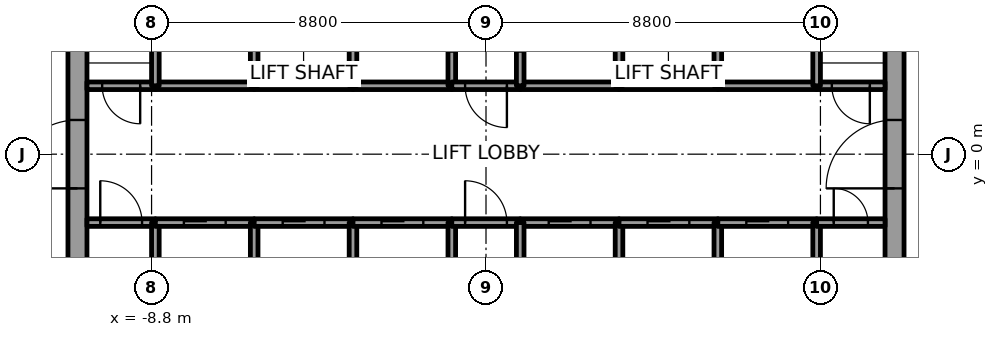
"""IFC4 building model, lengths in metres.
Left out: names, types, materials, properties, quantities, classifications, styles, units other than length and angle.
Written with IfcOpenShell. Run it as: python <this file> out.ifc"""

import sys

from ifc_helpers import new_model, si_unit, direction, frame, frame_2d, origin, place, context, subcontext, project, spatial, rectangle, extrude, element, fill, save


model = new_model("IFC4")
c1 = context("Model", 3, precision=1e-05, world=origin(), true_north=direction((0.0, 1.0)))
c2 = subcontext(c1, "Body", "Model", "MODEL_VIEW")
j1 = project(units=[si_unit("LENGTHUNIT", "METRE"), si_unit("PLANEANGLEUNIT", "RADIAN")], contexts=[c1])
p1 = place(None, origin())
s1 = spatial("IfcSite", under=j1, at=p1, CompositionType="ELEMENT")
p2 = place(p1, origin())
s2 = spatial("IfcBuilding", under=s1, at=p2, CompositionType="ELEMENT")
p3 = place(p2, frame((0.0, 0.0, 145.8)))
s3 = spatial("IfcBuildingStorey", under=s2, at=p3, CompositionType="ELEMENT", Elevation=145.8)
p4 = place(p3, frame((-10.75, -7.5, 0.0), z_axis=(0.0, 0.0, 1.0), x_axis=(0.0, 1.0, 0.0)))
e1 = element("IfcWall", 1, at=p4, inside=s3, PredefinedType="SHEAR", context=c2, shape_type="SweptSolid", body=[
    extrude(rectangle(XDim=15.0, YDim=0.5, at=frame_2d((7.5, 0.0))), origin(), (0.0, 0.0, 1.0), 4.0),
])
p5 = place(p4, frame((6.6, 0.0, 0.0)))
e2 = element("IfcOpeningElement", 2, at=p5, cuts=e1, PredefinedType="OPENING", context=c2, shape_type="SweptSolid", body=[
    extrude(rectangle(XDim=1.8, YDim=2.1, at=frame_2d((0.9, 1.05))), frame((0.0, 0.25, 0.0), z_axis=(0.0, -1.0, 0.0), x_axis=(1.0, 0.0, 0.0)), (0.0, 0.0, 1.0), 0.5),
])
p6 = place(p3, frame((10.75, -7.5, 0.0), z_axis=(0.0, 0.0, 1.0), x_axis=(0.0, 1.0, 0.0)))
e3 = element("IfcWall", 3, at=p6, inside=s3, PredefinedType="SHEAR", context=c2, shape_type="SweptSolid", body=[
    extrude(rectangle(XDim=15.0, YDim=0.5, at=frame_2d((7.5, 0.0))), origin(), (0.0, 0.0, 1.0), 4.0),
])
p7 = place(p6, frame((6.6, 0.0, 0.0)))
e4 = element("IfcOpeningElement", 4, at=p7, cuts=e3, PredefinedType="OPENING", context=c2, shape_type="SweptSolid", body=[
    extrude(rectangle(XDim=1.8, YDim=2.1, at=frame_2d((0.9, 1.05))), frame((0.0, 0.25, 0.0), z_axis=(0.0, -1.0, 0.0), x_axis=(1.0, 0.0, 0.0)), (0.0, 0.0, 1.0), 0.5),
])
p8 = place(p3, frame((-10.5, -1.8, 0.0), z_axis=(0.0, 0.0, 1.0), x_axis=(1.0, 0.0, 0.0)))
e5 = element("IfcWall", 5, at=p8, inside=s3, PredefinedType="SOLIDWALL", context=c2, shape_type="SweptSolid", body=[
    extrude(rectangle(XDim=1.8, YDim=0.2, at=frame_2d((0.9, 0.0))), origin(), (0.0, 0.0, 1.0), 3.85),
])
p9 = place(p8, frame((0.35, 0.0, 0.0)))
e6 = element("IfcOpeningElement", 6, at=p9, cuts=e5, PredefinedType="OPENING", context=c2, shape_type="SweptSolid", body=[
    extrude(rectangle(XDim=1.1, YDim=2.1, at=frame_2d((0.55, 1.05))), frame((0.0, 0.1, 0.0), z_axis=(0.0, -1.0, 0.0), x_axis=(1.0, 0.0, 0.0)), (0.0, 0.0, 1.0), 0.2),
])
p10 = place(p3, frame((-8.7, 1.8, 0.0), z_axis=(0.0, 0.0, 1.0), x_axis=(-1.0, 0.0, 0.0)))
e7 = element("IfcWall", 7, at=p10, inside=s3, PredefinedType="SOLIDWALL", context=c2, shape_type="SweptSolid", body=[
    extrude(rectangle(XDim=1.8, YDim=0.2, at=frame_2d((0.9, 0.0))), origin(), (0.0, 0.0, 1.0), 3.85),
])
p11 = place(p10, frame((0.4, 0.0, 0.0)))
e8 = element("IfcOpeningElement", 8, at=p11, cuts=e7, PredefinedType="OPENING", context=c2, shape_type="SweptSolid", body=[
    extrude(rectangle(XDim=1.0, YDim=2.1, at=frame_2d((0.5, 1.05))), frame((0.0, 0.1, 0.0), z_axis=(0.0, -1.0, 0.0), x_axis=(1.0, 0.0, 0.0)), (0.0, 0.0, 1.0), 0.2),
])
p12 = place(p3, frame((-8.7, -4.6, 0.0), z_axis=(0.0, 0.0, 1.0), x_axis=(0.0, 1.0, 0.0)))
e9 = element("IfcWall", 9, at=p12, inside=s3, PredefinedType="SOLIDWALL", context=c2, shape_type="SweptSolid", body=[
    extrude(rectangle(XDim=2.8, YDim=0.2, at=frame_2d((1.4, 0.0))), origin(), (0.0, 0.0, 1.0), 3.85),
])
p13 = place(p3, frame((-8.7, -1.8, 0.0), z_axis=(0.0, 0.0, 1.0), x_axis=(1.0, 0.0, 0.0)))
e10 = element("IfcWall", 10, at=p13, inside=s3, PredefinedType="SOLIDWALL", context=c2, shape_type="SweptSolid", body=[
    extrude(rectangle(XDim=2.6, YDim=0.2, at=frame_2d((1.3, 0.0))), origin(), (0.0, 0.0, 1.0), 3.85),
])
p14 = place(p13, frame((0.75, 0.0, 0.0)))
e11 = element("IfcOpeningElement", 11, at=p14, cuts=e10, PredefinedType="OPENING", context=c2, shape_type="SweptSolid", body=[
    extrude(rectangle(XDim=1.1, YDim=2.1, at=frame_2d((0.55, 1.05))), frame((0.0, 0.1, 0.0), z_axis=(0.0, -1.0, 0.0), x_axis=(1.0, 0.0, 0.0)), (0.0, 0.0, 1.0), 0.2),
])
p15 = place(p3, frame((-6.1, 1.8, 0.0), z_axis=(0.0, 0.0, 1.0), x_axis=(-1.0, 0.0, 0.0)))
e12 = element("IfcWall", 12, at=p15, inside=s3, PredefinedType="SOLIDWALL", context=c2, shape_type="SweptSolid", body=[
    extrude(rectangle(XDim=2.6, YDim=0.2, at=frame_2d((1.3, 0.0))), origin(), (0.0, 0.0, 1.0), 3.85),
])
for number, where, z_axis, x_axis in (
    (13, (-8.7, 1.8, 0.0), (0.0, 0.0, 1.0), (0.0, 1.0, 0.0)),
    (14, (-6.1, -4.6, 0.0), (0.0, 0.0, 1.0), (0.0, 1.0, 0.0)),
):
    element("IfcWall", number, at=place(p3, frame(where, z_axis=z_axis, x_axis=x_axis)), inside=s3, PredefinedType="SOLIDWALL", context=c2, shape_type="SweptSolid", body=[
        extrude(rectangle(XDim=2.8, YDim=0.2, at=frame_2d((1.4, 0.0))), origin(), (0.0, 0.0, 1.0), 3.85),
    ])
p16 = place(p3, frame((-6.1, -1.8, 0.0), z_axis=(0.0, 0.0, 1.0), x_axis=(1.0, 0.0, 0.0)))
e15 = element("IfcWall", 15, at=p16, inside=s3, PredefinedType="SOLIDWALL", context=c2, shape_type="SweptSolid", body=[
    extrude(rectangle(XDim=2.6, YDim=0.2, at=frame_2d((1.3, 0.0))), origin(), (0.0, 0.0, 1.0), 3.85),
])
p17 = place(p16, frame((0.75, 0.0, 0.0)))
e16 = element("IfcOpeningElement", 16, at=p17, cuts=e15, PredefinedType="OPENING", context=c2, shape_type="SweptSolid", body=[
    extrude(rectangle(XDim=1.1, YDim=2.1, at=frame_2d((0.55, 1.05))), frame((0.0, 0.1, 0.0), z_axis=(0.0, -1.0, 0.0), x_axis=(1.0, 0.0, 0.0)), (0.0, 0.0, 1.0), 0.2),
])
p18 = place(p3, frame((-3.5, 1.8, 0.0), z_axis=(0.0, 0.0, 1.0), x_axis=(-1.0, 0.0, 0.0)))
e17 = element("IfcWall", 17, at=p18, inside=s3, PredefinedType="SOLIDWALL", context=c2, shape_type="SweptSolid", body=[
    extrude(rectangle(XDim=2.6, YDim=0.2, at=frame_2d((1.3, 0.0))), origin(), (0.0, 0.0, 1.0), 3.85),
])
for number, where, z_axis, x_axis in (
    (18, (-6.1, 1.8, 0.0), (0.0, 0.0, 1.0), (0.0, 1.0, 0.0)),
    (19, (-3.5, -4.6, 0.0), (0.0, 0.0, 1.0), (0.0, 1.0, 0.0)),
):
    element("IfcWall", number, at=place(p3, frame(where, z_axis=z_axis, x_axis=x_axis)), inside=s3, PredefinedType="SOLIDWALL", context=c2, shape_type="SweptSolid", body=[
        extrude(rectangle(XDim=2.8, YDim=0.2, at=frame_2d((1.4, 0.0))), origin(), (0.0, 0.0, 1.0), 3.85),
    ])
p19 = place(p3, frame((-3.5, -1.8, 0.0), z_axis=(0.0, 0.0, 1.0), x_axis=(1.0, 0.0, 0.0)))
e20 = element("IfcWall", 20, at=p19, inside=s3, PredefinedType="SOLIDWALL", context=c2, shape_type="SweptSolid", body=[
    extrude(rectangle(XDim=2.6, YDim=0.2, at=frame_2d((1.3, 0.0))), origin(), (0.0, 0.0, 1.0), 3.85),
])
p20 = place(p19, frame((0.75, 0.0, 0.0)))
e21 = element("IfcOpeningElement", 21, at=p20, cuts=e20, PredefinedType="OPENING", context=c2, shape_type="SweptSolid", body=[
    extrude(rectangle(XDim=1.1, YDim=2.1, at=frame_2d((0.55, 1.05))), frame((0.0, 0.1, 0.0), z_axis=(0.0, -1.0, 0.0), x_axis=(1.0, 0.0, 0.0)), (0.0, 0.0, 1.0), 0.2),
])
p21 = place(p3, frame((-0.9, 1.8, 0.0), z_axis=(0.0, 0.0, 1.0), x_axis=(-1.0, 0.0, 0.0)))
e22 = element("IfcWall", 22, at=p21, inside=s3, PredefinedType="SOLIDWALL", context=c2, shape_type="SweptSolid", body=[
    extrude(rectangle(XDim=2.6, YDim=0.2, at=frame_2d((1.3, 0.0))), origin(), (0.0, 0.0, 1.0), 3.85),
])
p22 = place(p3, frame((-3.5, 4.6, 0.0), z_axis=(0.0, 0.0, 1.0), x_axis=(0.0, -1.0, 0.0)))
e23 = element("IfcWall", 23, at=p22, inside=s3, PredefinedType="SOLIDWALL", context=c2, shape_type="SweptSolid", body=[
    extrude(rectangle(XDim=2.8, YDim=0.2, at=frame_2d((1.4, 0.0))), origin(), (0.0, 0.0, 1.0), 3.85),
])
p23 = place(p3, frame((-0.9, 1.8, 0.0), z_axis=(0.0, 0.0, 1.0), x_axis=(0.0, 1.0, 0.0)))
e24 = element("IfcWall", 24, at=p23, inside=s3, PredefinedType="SOLIDWALL", context=c2, shape_type="SweptSolid", body=[
    extrude(rectangle(XDim=3.0, YDim=0.2, at=frame_2d((1.5, 0.0))), origin(), (0.0, 0.0, 1.0), 3.85),
])
p24 = place(p23, frame((0.9, 0.0, 0.0)))
e25 = element("IfcOpeningElement", 25, at=p24, cuts=e24, PredefinedType="OPENING", context=c2, shape_type="SweptSolid", body=[
    extrude(rectangle(XDim=1.2, YDim=2.1, at=frame_2d((0.6, 1.05))), frame((0.0, 0.1, 0.0), z_axis=(0.0, -1.0, 0.0), x_axis=(1.0, 0.0, 0.0)), (0.0, 0.0, 1.0), 0.2),
])
p25 = place(p3, frame((-0.9, -4.6, 0.0), z_axis=(0.0, 0.0, 1.0), x_axis=(0.0, 1.0, 0.0)))
e26 = element("IfcWall", 26, at=p25, inside=s3, PredefinedType="SOLIDWALL", context=c2, shape_type="SweptSolid", body=[
    extrude(rectangle(XDim=2.8, YDim=0.2, at=frame_2d((1.4, 0.0))), origin(), (0.0, 0.0, 1.0), 3.85),
])
p26 = place(p3, frame((-0.9, -1.8, 0.0), z_axis=(0.0, 0.0, 1.0), x_axis=(1.0, 0.0, 0.0)))
e27 = element("IfcWall", 27, at=p26, inside=s3, PredefinedType="SOLIDWALL", context=c2, shape_type="SweptSolid", body=[
    extrude(rectangle(XDim=1.8, YDim=0.2, at=frame_2d((0.9, 0.0))), origin(), (0.0, 0.0, 1.0), 3.85),
])
p27 = place(p26, frame((0.35, 0.0, 0.0)))
e28 = element("IfcOpeningElement", 28, at=p27, cuts=e27, PredefinedType="OPENING", context=c2, shape_type="SweptSolid", body=[
    extrude(rectangle(XDim=1.1, YDim=2.1, at=frame_2d((0.55, 1.05))), frame((0.0, 0.1, 0.0), z_axis=(0.0, -1.0, 0.0), x_axis=(1.0, 0.0, 0.0)), (0.0, 0.0, 1.0), 0.2),
])
p28 = place(p3, frame((0.9, 1.8, 0.0), z_axis=(0.0, 0.0, 1.0), x_axis=(-1.0, 0.0, 0.0)))
e29 = element("IfcWall", 29, at=p28, inside=s3, PredefinedType="SOLIDWALL", context=c2, shape_type="SweptSolid", body=[
    extrude(rectangle(XDim=1.8, YDim=0.2, at=frame_2d((0.9, 0.0))), origin(), (0.0, 0.0, 1.0), 3.85),
])
p29 = place(p28, frame((0.35, 0.0, 0.0)))
e30 = element("IfcOpeningElement", 30, at=p29, cuts=e29, PredefinedType="OPENING", context=c2, shape_type="SweptSolid", body=[
    extrude(rectangle(XDim=1.1, YDim=2.1, at=frame_2d((0.55, 1.05))), frame((0.0, 0.1, 0.0), z_axis=(0.0, -1.0, 0.0), x_axis=(1.0, 0.0, 0.0)), (0.0, 0.0, 1.0), 0.2),
])
p30 = place(p3, frame((0.9, -1.8, 0.0), z_axis=(0.0, 0.0, 1.0), x_axis=(1.0, 0.0, 0.0)))
e31 = element("IfcWall", 31, at=p30, inside=s3, PredefinedType="SOLIDWALL", context=c2, shape_type="SweptSolid", body=[
    extrude(rectangle(XDim=2.6, YDim=0.2, at=frame_2d((1.3, 0.0))), origin(), (0.0, 0.0, 1.0), 3.85),
])
p31 = place(p30, frame((0.75, 0.0, 0.0)))
e32 = element("IfcOpeningElement", 32, at=p31, cuts=e31, PredefinedType="OPENING", context=c2, shape_type="SweptSolid", body=[
    extrude(rectangle(XDim=1.1, YDim=2.1, at=frame_2d((0.55, 1.05))), frame((0.0, 0.1, 0.0), z_axis=(0.0, -1.0, 0.0), x_axis=(1.0, 0.0, 0.0)), (0.0, 0.0, 1.0), 0.2),
])
p32 = place(p3, frame((0.9, -1.8, 0.0), z_axis=(0.0, 0.0, 1.0), x_axis=(0.0, -1.0, 0.0)))
e33 = element("IfcWall", 33, at=p32, inside=s3, PredefinedType="SOLIDWALL", context=c2, shape_type="SweptSolid", body=[
    extrude(rectangle(XDim=2.8, YDim=0.2, at=frame_2d((1.4, 0.0))), origin(), (0.0, 0.0, 1.0), 3.85),
])
p33 = place(p3, frame((3.5, 1.8, 0.0), z_axis=(0.0, 0.0, 1.0), x_axis=(-1.0, 0.0, 0.0)))
e34 = element("IfcWall", 34, at=p33, inside=s3, PredefinedType="SOLIDWALL", context=c2, shape_type="SweptSolid", body=[
    extrude(rectangle(XDim=2.6, YDim=0.2, at=frame_2d((1.3, 0.0))), origin(), (0.0, 0.0, 1.0), 3.85),
])
p34 = place(p3, frame((0.9, 4.8, 0.0), z_axis=(0.0, 0.0, 1.0), x_axis=(0.0, -1.0, 0.0)))
e35 = element("IfcWall", 35, at=p34, inside=s3, PredefinedType="SOLIDWALL", context=c2, shape_type="SweptSolid", body=[
    extrude(rectangle(XDim=3.0, YDim=0.2, at=frame_2d((1.5, 0.0))), origin(), (0.0, 0.0, 1.0), 3.85),
])
p35 = place(p34, frame((0.9, 0.0, 0.0)))
e36 = element("IfcOpeningElement", 36, at=p35, cuts=e35, PredefinedType="OPENING", context=c2, shape_type="SweptSolid", body=[
    extrude(rectangle(XDim=1.2, YDim=2.1, at=frame_2d((0.6, 1.05))), frame((0.0, 0.1, 0.0), z_axis=(0.0, -1.0, 0.0), x_axis=(1.0, 0.0, 0.0)), (0.0, 0.0, 1.0), 0.2),
])
p36 = place(p3, frame((3.5, -4.6, 0.0), z_axis=(0.0, 0.0, 1.0), x_axis=(0.0, 1.0, 0.0)))
e37 = element("IfcWall", 37, at=p36, inside=s3, PredefinedType="SOLIDWALL", context=c2, shape_type="SweptSolid", body=[
    extrude(rectangle(XDim=2.8, YDim=0.2, at=frame_2d((1.4, 0.0))), origin(), (0.0, 0.0, 1.0), 3.85),
])
p37 = place(p3, frame((3.5, -1.8, 0.0), z_axis=(0.0, 0.0, 1.0), x_axis=(1.0, 0.0, 0.0)))
e38 = element("IfcWall", 38, at=p37, inside=s3, PredefinedType="SOLIDWALL", context=c2, shape_type="SweptSolid", body=[
    extrude(rectangle(XDim=2.6, YDim=0.2, at=frame_2d((1.3, 0.0))), origin(), (0.0, 0.0, 1.0), 3.85),
])
p38 = place(p37, frame((0.75, 0.0, 0.0)))
e39 = element("IfcOpeningElement", 39, at=p38, cuts=e38, PredefinedType="OPENING", context=c2, shape_type="SweptSolid", body=[
    extrude(rectangle(XDim=1.1, YDim=2.1, at=frame_2d((0.55, 1.05))), frame((0.0, 0.1, 0.0), z_axis=(0.0, -1.0, 0.0), x_axis=(1.0, 0.0, 0.0)), (0.0, 0.0, 1.0), 0.2),
])
p39 = place(p3, frame((6.1, 1.8, 0.0), z_axis=(0.0, 0.0, 1.0), x_axis=(-1.0, 0.0, 0.0)))
e40 = element("IfcWall", 40, at=p39, inside=s3, PredefinedType="SOLIDWALL", context=c2, shape_type="SweptSolid", body=[
    extrude(rectangle(XDim=2.6, YDim=0.2, at=frame_2d((1.3, 0.0))), origin(), (0.0, 0.0, 1.0), 3.85),
])
for number, where, z_axis, x_axis in (
    (41, (3.5, 1.8, 0.0), (0.0, 0.0, 1.0), (0.0, 1.0, 0.0)),
    (42, (6.1, -4.6, 0.0), (0.0, 0.0, 1.0), (0.0, 1.0, 0.0)),
):
    element("IfcWall", number, at=place(p3, frame(where, z_axis=z_axis, x_axis=x_axis)), inside=s3, PredefinedType="SOLIDWALL", context=c2, shape_type="SweptSolid", body=[
        extrude(rectangle(XDim=2.8, YDim=0.2, at=frame_2d((1.4, 0.0))), origin(), (0.0, 0.0, 1.0), 3.85),
    ])
p40 = place(p3, frame((6.1, -1.8, 0.0), z_axis=(0.0, 0.0, 1.0), x_axis=(1.0, 0.0, 0.0)))
e43 = element("IfcWall", 43, at=p40, inside=s3, PredefinedType="SOLIDWALL", context=c2, shape_type="SweptSolid", body=[
    extrude(rectangle(XDim=2.6, YDim=0.2, at=frame_2d((1.3, 0.0))), origin(), (0.0, 0.0, 1.0), 3.85),
])
p41 = place(p40, frame((0.75, 0.0, 0.0)))
e44 = element("IfcOpeningElement", 44, at=p41, cuts=e43, PredefinedType="OPENING", context=c2, shape_type="SweptSolid", body=[
    extrude(rectangle(XDim=1.1, YDim=2.1, at=frame_2d((0.55, 1.05))), frame((0.0, 0.1, 0.0), z_axis=(0.0, -1.0, 0.0), x_axis=(1.0, 0.0, 0.0)), (0.0, 0.0, 1.0), 0.2),
])
p42 = place(p3, frame((8.7, 1.8, 0.0), z_axis=(0.0, 0.0, 1.0), x_axis=(-1.0, 0.0, 0.0)))
e45 = element("IfcWall", 45, at=p42, inside=s3, PredefinedType="SOLIDWALL", context=c2, shape_type="SweptSolid", body=[
    extrude(rectangle(XDim=2.6, YDim=0.2, at=frame_2d((1.3, 0.0))), origin(), (0.0, 0.0, 1.0), 3.85),
])
for number, where, z_axis, x_axis in (
    (46, (6.1, 1.8, 0.0), (0.0, 0.0, 1.0), (0.0, 1.0, 0.0)),
    (47, (8.7, -1.8, 0.0), (0.0, 0.0, 1.0), (0.0, -1.0, 0.0)),
):
    element("IfcWall", number, at=place(p3, frame(where, z_axis=z_axis, x_axis=x_axis)), inside=s3, PredefinedType="SOLIDWALL", context=c2, shape_type="SweptSolid", body=[
        extrude(rectangle(XDim=2.8, YDim=0.2, at=frame_2d((1.4, 0.0))), origin(), (0.0, 0.0, 1.0), 3.85),
    ])
p43 = place(p3, frame((8.7, -1.8, 0.0), z_axis=(0.0, 0.0, 1.0), x_axis=(1.0, 0.0, 0.0)))
e48 = element("IfcWall", 48, at=p43, inside=s3, PredefinedType="SOLIDWALL", context=c2, shape_type="SweptSolid", body=[
    extrude(rectangle(XDim=1.8, YDim=0.2, at=frame_2d((0.9, 0.0))), origin(), (0.0, 0.0, 1.0), 3.85),
])
p44 = place(p43, frame((0.45, 0.0, 0.0)))
e49 = element("IfcOpeningElement", 49, at=p44, cuts=e48, PredefinedType="OPENING", context=c2, shape_type="SweptSolid", body=[
    extrude(rectangle(XDim=0.9, YDim=2.1, at=frame_2d((0.45, 1.05))), frame((0.0, 0.1, 0.0), z_axis=(0.0, -1.0, 0.0), x_axis=(1.0, 0.0, 0.0)), (0.0, 0.0, 1.0), 0.2),
])
p45 = place(p3, frame((10.5, 1.8, 0.0), z_axis=(0.0, 0.0, 1.0), x_axis=(-1.0, 0.0, 0.0)))
e50 = element("IfcWall", 50, at=p45, inside=s3, PredefinedType="SOLIDWALL", context=c2, shape_type="SweptSolid", body=[
    extrude(rectangle(XDim=1.8, YDim=0.2, at=frame_2d((0.9, 0.0))), origin(), (0.0, 0.0, 1.0), 3.85),
])
p46 = place(p45, frame((0.4, 0.0, 0.0)))
e51 = element("IfcOpeningElement", 51, at=p46, cuts=e50, PredefinedType="OPENING", context=c2, shape_type="SweptSolid", body=[
    extrude(rectangle(XDim=1.0, YDim=2.1, at=frame_2d((0.5, 1.05))), frame((0.0, 0.1, 0.0), z_axis=(0.0, -1.0, 0.0), x_axis=(1.0, 0.0, 0.0)), (0.0, 0.0, 1.0), 0.2),
])
p47 = place(p3, frame((8.7, 4.6, 0.0), z_axis=(0.0, 0.0, 1.0), x_axis=(0.0, -1.0, 0.0)))
e52 = element("IfcWall", 52, at=p47, inside=s3, PredefinedType="SOLIDWALL", context=c2, shape_type="SweptSolid", body=[
    extrude(rectangle(XDim=2.8, YDim=0.2, at=frame_2d((1.4, 0.0))), origin(), (0.0, 0.0, 1.0), 3.85),
])
p48 = place(p14, origin())
e53 = element("IfcDoor", 53, at=p48, inside=s3, OperationType="SLIDING_TO_LEFT", PredefinedType="DOOR", context=c2, shape_type="SweptSolid", body=[
    extrude(rectangle(XDim=1.1, YDim=2.1, at=frame_2d((0.55, 1.05))), frame((0.0, 0.025, 0.0), z_axis=(0.0, -1.0, 0.0), x_axis=(1.0, 0.0, 0.0)), (0.0, 0.0, 1.0), 0.05),
])
fill(e11, e53)
p49 = place(p17, origin())
e54 = element("IfcDoor", 54, at=p49, inside=s3, OperationType="SLIDING_TO_LEFT", PredefinedType="DOOR", context=c2, shape_type="SweptSolid", body=[
    extrude(rectangle(XDim=1.1, YDim=2.1, at=frame_2d((0.55, 1.05))), frame((0.0, 0.025, 0.0), z_axis=(0.0, -1.0, 0.0), x_axis=(1.0, 0.0, 0.0)), (0.0, 0.0, 1.0), 0.05),
])
fill(e16, e54)
p50 = place(p20, origin())
e55 = element("IfcDoor", 55, at=p50, inside=s3, OperationType="SLIDING_TO_RIGHT", PredefinedType="DOOR", context=c2, shape_type="SweptSolid", body=[
    extrude(rectangle(XDim=1.1, YDim=2.1, at=frame_2d((0.55, 1.05))), frame((0.0, 0.025, 0.0), z_axis=(0.0, -1.0, 0.0), x_axis=(1.0, 0.0, 0.0)), (0.0, 0.0, 1.0), 0.05),
])
fill(e21, e55)
p51 = place(p31, origin())
e56 = element("IfcDoor", 56, at=p51, inside=s3, OperationType="SLIDING_TO_LEFT", PredefinedType="DOOR", context=c2, shape_type="SweptSolid", body=[
    extrude(rectangle(XDim=1.1, YDim=2.1, at=frame_2d((0.55, 1.05))), frame((0.0, 0.025, 0.0), z_axis=(0.0, -1.0, 0.0), x_axis=(1.0, 0.0, 0.0)), (0.0, 0.0, 1.0), 0.05),
])
fill(e32, e56)
p52 = place(p38, origin())
e57 = element("IfcDoor", 57, at=p52, inside=s3, OperationType="SLIDING_TO_RIGHT", PredefinedType="DOOR", context=c2, shape_type="SweptSolid", body=[
    extrude(rectangle(XDim=1.1, YDim=2.1, at=frame_2d((0.55, 1.05))), frame((0.0, 0.025, 0.0), z_axis=(0.0, -1.0, 0.0), x_axis=(1.0, 0.0, 0.0)), (0.0, 0.0, 1.0), 0.05),
])
fill(e39, e57)
p53 = place(p41, origin())
e58 = element("IfcDoor", 58, at=p53, inside=s3, OperationType="SLIDING_TO_RIGHT", PredefinedType="DOOR", context=c2, shape_type="SweptSolid", body=[
    extrude(rectangle(XDim=1.1, YDim=2.1, at=frame_2d((0.55, 1.05))), frame((0.0, 0.025, 0.0), z_axis=(0.0, -1.0, 0.0), x_axis=(1.0, 0.0, 0.0)), (0.0, 0.0, 1.0), 0.05),
])
fill(e44, e58)
p54 = place(p9, origin())
e59 = element("IfcDoor", 59, at=p54, inside=s3, OperationType="SINGLE_SWING_RIGHT", PredefinedType="DOOR", context=c2, shape_type="SweptSolid", body=[
    extrude(rectangle(XDim=1.1, YDim=2.1, at=frame_2d((0.55, 1.05))), frame((0.0, 0.025, 0.0), z_axis=(0.0, -1.0, 0.0), x_axis=(1.0, 0.0, 0.0)), (0.0, 0.0, 1.0), 0.05),
])
fill(e6, e59)
p55 = place(p29, origin())
e60 = element("IfcDoor", 60, at=p55, inside=s3, OperationType="SINGLE_SWING_RIGHT", PredefinedType="DOOR", context=c2, shape_type="SweptSolid", body=[
    extrude(rectangle(XDim=1.1, YDim=2.1, at=frame_2d((0.55, 1.05))), frame((0.0, 0.025, 0.0), z_axis=(0.0, -1.0, 0.0), x_axis=(1.0, 0.0, 0.0)), (0.0, 0.0, 1.0), 0.05),
])
fill(e30, e60)
p56 = place(p27, origin())
e61 = element("IfcDoor", 61, at=p56, inside=s3, OperationType="SINGLE_SWING_LEFT", PredefinedType="DOOR", context=c2, shape_type="SweptSolid", body=[
    extrude(rectangle(XDim=1.1, YDim=2.1, at=frame_2d((0.55, 1.05))), frame((0.0, 0.025, 0.0), z_axis=(0.0, -1.0, 0.0), x_axis=(1.0, 0.0, 0.0)), (0.0, 0.0, 1.0), 0.05),
])
fill(e28, e61)
p57 = place(p11, origin())
e62 = element("IfcDoor", 62, at=p57, inside=s3, OperationType="SINGLE_SWING_RIGHT", PredefinedType="DOOR", context=c2, shape_type="SweptSolid", body=[
    extrude(rectangle(XDim=1.0, YDim=2.1, at=frame_2d((0.5, 1.05))), frame((0.0, 0.025, 0.0), z_axis=(0.0, -1.0, 0.0), x_axis=(1.0, 0.0, 0.0)), (0.0, 0.0, 1.0), 0.05),
])
fill(e8, e62)
p58 = place(p46, origin())
e63 = element("IfcDoor", 63, at=p58, inside=s3, OperationType="SINGLE_SWING_LEFT", PredefinedType="DOOR", context=c2, shape_type="SweptSolid", body=[
    extrude(rectangle(XDim=1.0, YDim=2.1, at=frame_2d((0.5, 1.05))), frame((0.0, 0.025, 0.0), z_axis=(0.0, -1.0, 0.0), x_axis=(1.0, 0.0, 0.0)), (0.0, 0.0, 1.0), 0.05),
])
fill(e51, e63)
p59 = place(p44, origin())
e64 = element("IfcDoor", 64, at=p59, inside=s3, OperationType="SINGLE_SWING_RIGHT", PredefinedType="DOOR", context=c2, shape_type="SweptSolid", body=[
    extrude(rectangle(XDim=0.9, YDim=2.1, at=frame_2d((0.45, 1.05))), frame((0.0, 0.025, 0.0), z_axis=(0.0, -1.0, 0.0), x_axis=(1.0, 0.0, 0.0)), (0.0, 0.0, 1.0), 0.05),
])
fill(e49, e64)
p60 = place(p5, origin())
e65 = element("IfcDoor", 65, at=p60, inside=s3, OperationType="DOUBLE_DOOR_SINGLE_SWING", PredefinedType="DOOR", context=c2, shape_type="SweptSolid", body=[
    extrude(rectangle(XDim=1.8, YDim=2.1, at=frame_2d((0.9, 1.05))), frame((0.0, 0.025, 0.0), z_axis=(0.0, -1.0, 0.0), x_axis=(1.0, 0.0, 0.0)), (0.0, 0.0, 1.0), 0.05),
])
fill(e2, e65)
p61 = place(p7, origin())
e66 = element("IfcDoor", 66, at=p61, inside=s3, OperationType="DOUBLE_DOOR_SINGLE_SWING", PredefinedType="DOOR", context=c2, shape_type="SweptSolid", body=[
    extrude(rectangle(XDim=1.8, YDim=2.1, at=frame_2d((0.9, 1.05))), frame((0.0, 0.025, 0.0), z_axis=(0.0, -1.0, 0.0), x_axis=(1.0, 0.0, 0.0)), (0.0, 0.0, 1.0), 0.05),
])
fill(e4, e66)
save(model, sys.argv[1])
